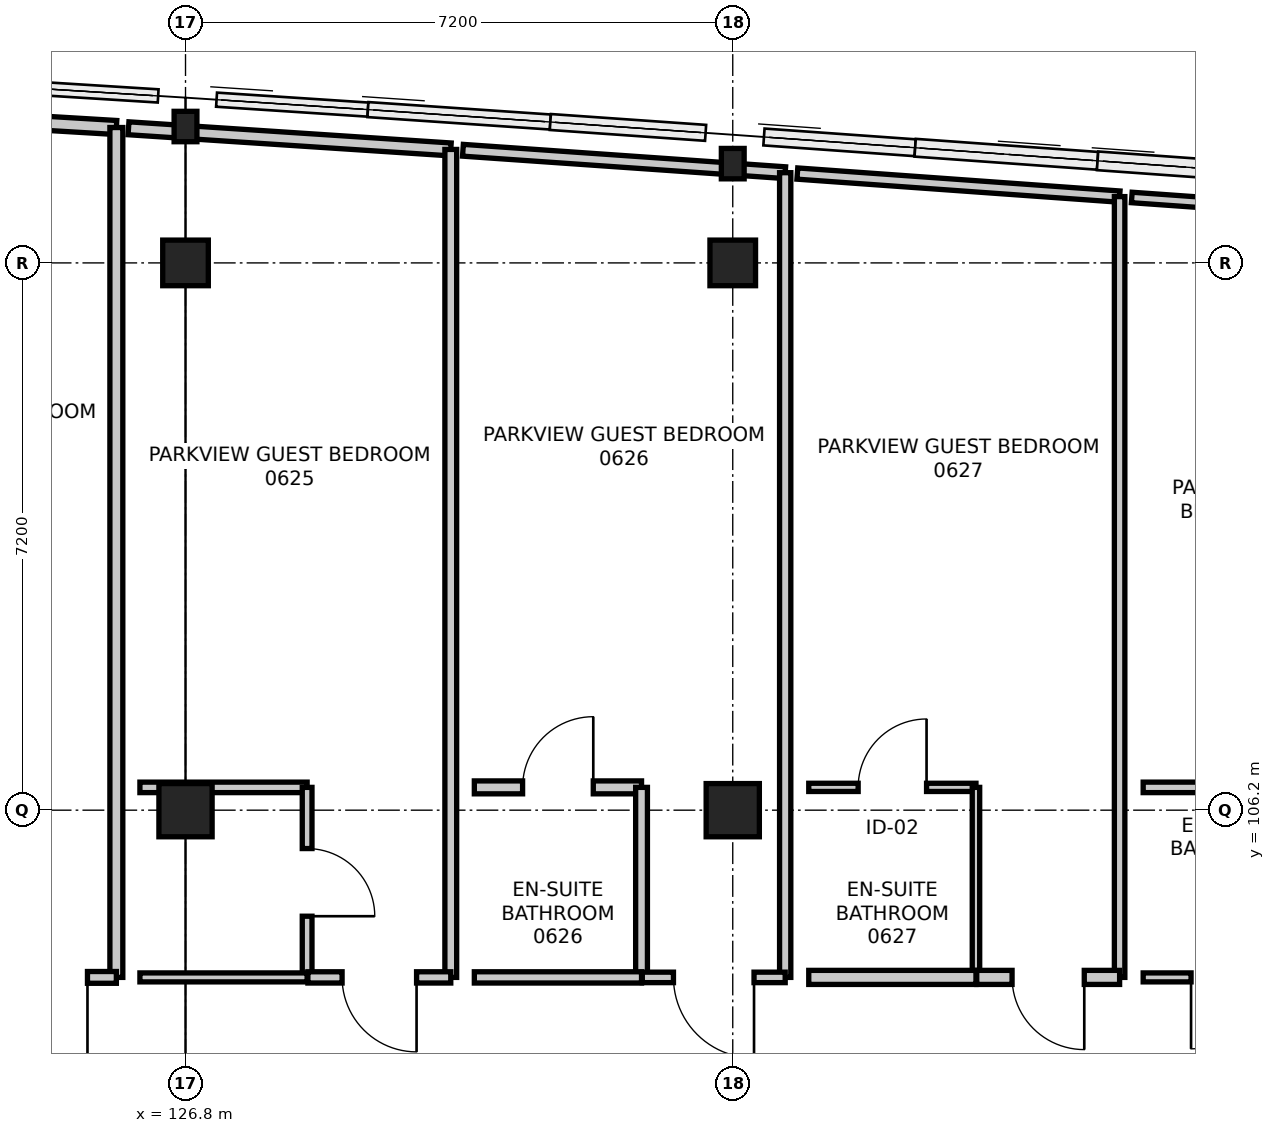
"""IFC4 building model, lengths in metres.
Left out: names, types, materials, properties, quantities, classifications, styles, units other than length and angle.
Written with IfcOpenShell. Run it as: python <this file> out.ifc"""

import sys

from ifc_helpers import new_model, si_unit, direction, frame, frame_2d, origin, origin_2d, place, context, subcontext, project, spatial, rectangle, i_section, extrude, element, fill, save


model = new_model("IFC4")
c1 = context("Model", 3, precision=1e-05, world=origin(), true_north=direction((0.0, 1.0)))
c2 = subcontext(c1, "Body", "Model", "MODEL_VIEW")
j1 = project(units=[si_unit("LENGTHUNIT", "METRE"), si_unit("PLANEANGLEUNIT", "RADIAN")], contexts=[c1])
p1 = place(None, origin())
s1 = spatial("IfcSite", under=j1, at=p1, CompositionType="ELEMENT")
p2 = place(p1, origin())
s2 = spatial("IfcBuilding", under=s1, at=p2, CompositionType="ELEMENT")
p3 = place(p2, frame((0.0, 0.0, 26.4)))
s3 = spatial("IfcBuildingStorey", under=s2, at=p3, CompositionType="ELEMENT", Elevation=26.4)
p4 = place(p3, frame((126.8, 106.2, 0.0), z_axis=(0.0, 0.0, 1.0), x_axis=(1.0, 0.0, 0.0)))
e1 = element("IfcColumn", 1, at=p4, inside=s3, PredefinedType="COLUMN", context=c2, shape_type="SweptSolid", body=[
    extrude(rectangle(XDim=0.7, YDim=0.7, at=origin_2d()), origin(), (0.0, 0.0, 1.0), 3.6),
])
p5 = place(p3, frame((126.8, 113.4, 0.0), z_axis=(0.0, 0.0, 1.0), x_axis=(1.0, 0.0, 0.0)))
e2 = element("IfcColumn", 2, at=p5, inside=s3, PredefinedType="COLUMN", context=c2, shape_type="SweptSolid", body=[
    extrude(rectangle(XDim=0.6, YDim=0.6, at=origin_2d()), origin(), (0.0, 0.0, 1.0), 3.6),
])
p6 = place(p3, frame((126.8, 115.194, 0.0), z_axis=(0.0, 0.0, 1.0), x_axis=(1.0, 0.0, 0.0)))
e3 = element("IfcColumn", 3, at=p6, inside=s3, PredefinedType="COLUMN", context=c2, shape_type="SweptSolid", body=[
    extrude(i_section(OverallWidth=0.3, OverallDepth=0.4, WebThickness=0.013, FlangeThickness=0.024, FilletRadius=0.027, at=origin_2d()), origin(), (0.0, 0.0, 1.0), 3.6),
])
p7 = place(p3, frame((134.0, 106.2, 0.0), z_axis=(0.0, 0.0, 1.0), x_axis=(1.0, 0.0, 0.0)))
e4 = element("IfcColumn", 4, at=p7, inside=s3, PredefinedType="COLUMN", context=c2, shape_type="SweptSolid", body=[
    extrude(rectangle(XDim=0.7, YDim=0.7, at=origin_2d()), origin(), (0.0, 0.0, 1.0), 3.6),
])
p8 = place(p3, frame((134.0, 113.4, 0.0), z_axis=(0.0, 0.0, 1.0), x_axis=(1.0, 0.0, 0.0)))
e5 = element("IfcColumn", 5, at=p8, inside=s3, PredefinedType="COLUMN", context=c2, shape_type="SweptSolid", body=[
    extrude(rectangle(XDim=0.6, YDim=0.6, at=origin_2d()), origin(), (0.0, 0.0, 1.0), 3.6),
])
p9 = place(p3, frame((134.0, 114.706, 0.0), z_axis=(0.0, 0.0, 1.0), x_axis=(1.0, 0.0, 0.0)))
e6 = element("IfcColumn", 6, at=p9, inside=s3, PredefinedType="COLUMN", context=c2, shape_type="SweptSolid", body=[
    extrude(i_section(OverallWidth=0.3, OverallDepth=0.4, WebThickness=0.013, FlangeThickness=0.024, FilletRadius=0.027, at=origin_2d()), origin(), (0.0, 0.0, 1.0), 3.6),
])
p10 = place(p3, frame((121.65, 115.435, 0.0), z_axis=(0.0, 0.0, 1.0), x_axis=(0.998211780047, -0.059776602248, 0.0)))
e7 = element("IfcWall", 7, at=p10, inside=s3, PredefinedType="PARTITIONING", context=c2, shape_type="SweptSolid", body=[
    extrude(rectangle(XDim=4.248, YDim=0.185, at=frame_2d((2.124, 0.0))), origin(), (0.0, 0.0, 1.0), 2.926),
])
p11 = place(p3, frame((125.89, 115.181, 0.0), z_axis=(0.0, 0.0, 1.0), x_axis=(0.0, -1.0, 0.0)))
e8 = element("IfcWall", 8, at=p11, inside=s3, PredefinedType="PARTITIONING", context=c2, shape_type="SweptSolid", body=[
    extrude(rectangle(XDim=11.181, YDim=0.17, at=frame_2d((5.591, 0.0))), origin(), (0.0, 0.0, 1.0), 2.735),
])
p12 = place(p3, frame((125.89, 104.0, 0.0), z_axis=(0.0, 0.0, 1.0), x_axis=(-1.0, 0.0, 0.0)))
e9 = element("IfcWall", 9, at=p12, inside=s3, PredefinedType="PARTITIONING", context=c2, shape_type="SweptSolid", body=[
    extrude(rectangle(XDim=1.88, YDim=0.155, at=frame_2d((0.94, 0.0))), origin(), (0.0, 0.0, 1.0), 3.35),
])
p13 = place(p12, frame((0.38, 0.0, 0.0)))
e10 = element("IfcOpeningElement", 10, at=p13, cuts=e9, PredefinedType="OPENING", context=c2, shape_type="SweptSolid", body=[
    extrude(rectangle(XDim=1.12, YDim=2.2, at=frame_2d((0.56, 1.1))), frame((0.0, 0.087, 0.0), z_axis=(0.0, -1.0, 0.0), x_axis=(1.0, 0.0, 0.0)), (0.0, 0.0, 1.0), 0.175),
])
p14 = place(p3, frame((126.2, 106.5, 0.0), z_axis=(0.0, 0.0, 1.0), x_axis=(1.0, 0.0, 0.0)))
e11 = element("IfcWall", 11, at=p14, inside=s3, PredefinedType="PARTITIONING", context=c2, shape_type="SweptSolid", body=[
    extrude(rectangle(XDim=2.2, YDim=0.138, at=frame_2d((1.1, 0.0))), origin(), (0.0, 0.0, 1.0), 2.685),
])
p15 = place(p3, frame((128.4, 106.5, 0.0), z_axis=(0.0, 0.0, 1.0), x_axis=(0.0, -1.0, 0.0)))
e12 = element("IfcWall", 12, at=p15, inside=s3, PredefinedType="PARTITIONING", context=c2, shape_type="SweptSolid", body=[
    extrude(rectangle(XDim=2.5, YDim=0.128, at=frame_2d((1.25, 0.0))), origin(), (0.0, 0.0, 1.0), 2.735),
])
p16 = place(p15, frame((0.805, 0.0, 0.0)))
e13 = element("IfcOpeningElement", 13, at=p16, cuts=e12, PredefinedType="OPENING", context=c2, shape_type="SweptSolid", body=[
    extrude(rectangle(XDim=0.89, YDim=2.09, at=frame_2d((0.445, 1.045))), frame((0.0, 0.074, 0.0), z_axis=(0.0, -1.0, 0.0), x_axis=(1.0, 0.0, 0.0)), (0.0, 0.0, 1.0), 0.148),
])
p17 = place(p3, frame((128.4, 104.0, 0.0), z_axis=(0.0, 0.0, 1.0), x_axis=(-1.0, 0.0, 0.0)))
e14 = element("IfcWall", 14, at=p17, inside=s3, PredefinedType="PARTITIONING", context=c2, shape_type="SweptSolid", body=[
    extrude(rectangle(XDim=2.2, YDim=0.118, at=frame_2d((1.1, 0.0))), origin(), (0.0, 0.0, 1.0), 2.685),
])
p18 = place(p3, frame((126.05, 115.171, 0.0), z_axis=(0.0, 0.0, 1.0), x_axis=(0.997852518731, -0.065500769929, 0.0)))
e15 = element("IfcWall", 15, at=p18, inside=s3, PredefinedType="PARTITIONING", context=c2, shape_type="SweptSolid", body=[
    extrude(rectangle(XDim=4.249, YDim=0.17, at=frame_2d((2.125, 0.0))), origin(), (0.0, 0.0, 1.0), 2.926),
])
p19 = place(p3, frame((130.29, 114.893, 0.0), z_axis=(0.0, 0.0, 1.0), x_axis=(0.0, -1.0, 0.0)))
e16 = element("IfcWall", 16, at=p19, inside=s3, PredefinedType="PARTITIONING", context=c2, shape_type="SweptSolid", body=[
    extrude(rectangle(XDim=10.893, YDim=0.155, at=frame_2d((5.446, 0.0))), origin(), (0.0, 0.0, 1.0), 2.735),
])
p20 = place(p3, frame((130.29, 104.0, 0.0), z_axis=(0.0, 0.0, 1.0), x_axis=(-1.0, 0.0, 0.0)))
e17 = element("IfcWall", 17, at=p20, inside=s3, PredefinedType="PARTITIONING", context=c2, shape_type="SweptSolid", body=[
    extrude(rectangle(XDim=1.88, YDim=0.148, at=frame_2d((0.94, 0.0))), origin(), (0.0, 0.0, 1.0), 3.35),
])
p21 = place(p20, frame((0.45, 0.0, 0.0)))
e18 = element("IfcOpeningElement", 18, at=p21, cuts=e17, PredefinedType="OPENING", context=c2, shape_type="SweptSolid", body=[
    extrude(rectangle(XDim=0.98, YDim=2.15, at=frame_2d((0.49, 1.075))), frame((0.0, 0.084, 0.0), z_axis=(0.0, -1.0, 0.0), x_axis=(1.0, 0.0, 0.0)), (0.0, 0.0, 1.0), 0.168),
])
p22 = place(p3, frame((130.6, 106.5, 0.0), z_axis=(0.0, 0.0, 1.0), x_axis=(1.0, 0.0, 0.0)))
e19 = element("IfcWall", 19, at=p22, inside=s3, PredefinedType="PARTITIONING", context=c2, shape_type="SweptSolid", body=[
    extrude(rectangle(XDim=2.2, YDim=0.17, at=frame_2d((1.1, 0.0))), origin(), (0.0, 0.0, 1.0), 2.735),
])
p23 = place(p22, frame((0.635, 0.0, 0.0)))
e20 = element("IfcOpeningElement", 20, at=p23, cuts=e19, PredefinedType="OPENING", context=c2, shape_type="SweptSolid", body=[
    extrude(rectangle(XDim=0.93, YDim=2.13, at=frame_2d((0.465, 1.065))), frame((0.0, 0.095, 0.0), z_axis=(0.0, -1.0, 0.0), x_axis=(1.0, 0.0, 0.0)), (0.0, 0.0, 1.0), 0.19),
])
p24 = place(p3, frame((132.8, 106.5, 0.0), z_axis=(0.0, 0.0, 1.0), x_axis=(0.0, -1.0, 0.0)))
e21 = element("IfcWall", 21, at=p24, inside=s3, PredefinedType="PARTITIONING", context=c2, shape_type="SweptSolid", body=[
    extrude(rectangle(XDim=2.5, YDim=0.155, at=frame_2d((1.25, 0.0))), origin(), (0.0, 0.0, 1.0), 2.735),
])
p25 = place(p3, frame((132.8, 104.0, 0.0), z_axis=(0.0, 0.0, 1.0), x_axis=(-1.0, 0.0, 0.0)))
e22 = element("IfcWall", 22, at=p25, inside=s3, PredefinedType="PARTITIONING", context=c2, shape_type="SweptSolid", body=[
    extrude(rectangle(XDim=2.2, YDim=0.148, at=frame_2d((1.1, 0.0))), origin(), (0.0, 0.0, 1.0), 3.35),
])
p26 = place(p3, frame((130.45, 114.882, 0.0), z_axis=(0.0, 0.0, 1.0), x_axis=(0.997589640376, -0.069389548314, 0.0)))
e23 = element("IfcWall", 23, at=p26, inside=s3, PredefinedType="PARTITIONING", context=c2, shape_type="SweptSolid", body=[
    extrude(rectangle(XDim=4.25, YDim=0.155, at=frame_2d((2.125, 0.0))), origin(), (0.0, 0.0, 1.0), 2.926),
])
p27 = place(p3, frame((134.69, 114.587, 0.0), z_axis=(0.0, 0.0, 1.0), x_axis=(0.0, -1.0, 0.0)))
e24 = element("IfcWall", 24, at=p27, inside=s3, PredefinedType="PARTITIONING", context=c2, shape_type="SweptSolid", body=[
    extrude(rectangle(XDim=10.587, YDim=0.148, at=frame_2d((5.293, 0.0))), origin(), (0.0, 0.0, 1.0), 2.735),
])
p28 = place(p3, frame((134.69, 104.0, 0.0), z_axis=(0.0, 0.0, 1.0), x_axis=(-1.0, 0.0, 0.0)))
e25 = element("IfcWall", 25, at=p28, inside=s3, PredefinedType="PARTITIONING", context=c2, shape_type="SweptSolid", body=[
    extrude(rectangle(XDim=1.88, YDim=0.138, at=frame_2d((0.94, 0.0))), origin(), (0.0, 0.0, 1.0), 2.685),
])
p29 = place(p28, frame((0.41, 0.0, 0.0)))
e26 = element("IfcOpeningElement", 26, at=p29, cuts=e25, PredefinedType="OPENING", context=c2, shape_type="SweptSolid", body=[
    extrude(rectangle(XDim=1.06, YDim=2.2, at=frame_2d((0.53, 1.1))), frame((0.0, 0.079, 0.0), z_axis=(0.0, -1.0, 0.0), x_axis=(1.0, 0.0, 0.0)), (0.0, 0.0, 1.0), 0.158),
])
p30 = place(p3, frame((135.0, 106.5, 0.0), z_axis=(0.0, 0.0, 1.0), x_axis=(1.0, 0.0, 0.0)))
e27 = element("IfcWall", 27, at=p30, inside=s3, PredefinedType="PARTITIONING", context=c2, shape_type="SweptSolid", body=[
    extrude(rectangle(XDim=2.2, YDim=0.108, at=frame_2d((1.1, 0.0))), origin(), (0.0, 0.0, 1.0), 3.35),
])
p31 = place(p30, frame((0.65, 0.0, 0.0)))
e28 = element("IfcOpeningElement", 28, at=p31, cuts=e27, PredefinedType="OPENING", context=c2, shape_type="SweptSolid", body=[
    extrude(rectangle(XDim=0.9, YDim=2.08, at=frame_2d((0.45, 1.04))), frame((0.0, 0.064, 0.0), z_axis=(0.0, -1.0, 0.0), x_axis=(1.0, 0.0, 0.0)), (0.0, 0.0, 1.0), 0.128),
])
p32 = place(p3, frame((137.2, 106.5, 0.0), z_axis=(0.0, 0.0, 1.0), x_axis=(0.0, -1.0, 0.0)))
e29 = element("IfcWall", 29, at=p32, inside=s3, PredefinedType="PARTITIONING", context=c2, shape_type="SweptSolid", body=[
    extrude(rectangle(XDim=2.5, YDim=0.098, at=frame_2d((1.25, 0.0))), origin(), (0.0, 0.0, 1.0), 2.735),
])
p33 = place(p3, frame((137.2, 104.0, 0.0), z_axis=(0.0, 0.0, 1.0), x_axis=(-1.0, 0.0, 0.0)))
e30 = element("IfcWall", 30, at=p33, inside=s3, PredefinedType="PARTITIONING", context=c2, shape_type="SweptSolid", body=[
    extrude(rectangle(XDim=2.2, YDim=0.185, at=frame_2d((1.1, 0.0))), origin(), (0.0, 0.0, 1.0), 3.35),
])
p34 = place(p3, frame((134.85, 114.575, 0.0), z_axis=(0.0, 0.0, 1.0), x_axis=(0.997456658619, -0.071275621198, 0.0)))
e31 = element("IfcWall", 31, at=p34, inside=s3, PredefinedType="PARTITIONING", context=c2, shape_type="SweptSolid", body=[
    extrude(rectangle(XDim=4.251, YDim=0.148, at=frame_2d((2.125, 0.0))), origin(), (0.0, 0.0, 1.0), 2.926),
])
p35 = place(p3, frame((139.09, 114.272, 0.0), z_axis=(0.0, 0.0, 1.0), x_axis=(0.0, -1.0, 0.0)))
e32 = element("IfcWall", 32, at=p35, inside=s3, PredefinedType="PARTITIONING", context=c2, shape_type="SweptSolid", body=[
    extrude(rectangle(XDim=10.272, YDim=0.138, at=frame_2d((5.136, 0.0))), origin(), (0.0, 0.0, 1.0), 2.735),
])
p36 = place(p3, frame((139.09, 104.0, 0.0), z_axis=(0.0, 0.0, 1.0), x_axis=(-1.0, 0.0, 0.0)))
e33 = element("IfcWall", 33, at=p36, inside=s3, PredefinedType="PARTITIONING", context=c2, shape_type="SweptSolid", body=[
    extrude(rectangle(XDim=1.88, YDim=0.185, at=frame_2d((0.94, 0.0))), origin(), (0.0, 0.0, 1.0), 3.35),
])
p37 = place(p36, frame((0.465, 0.0, 0.0)))
e34 = element("IfcOpeningElement", 34, at=p37, cuts=e33, PredefinedType="OPENING", context=c2, shape_type="SweptSolid", body=[
    extrude(rectangle(XDim=0.95, YDim=2.1, at=frame_2d((0.475, 1.05))), frame((0.0, 0.103, 0.0), z_axis=(0.0, -1.0, 0.0), x_axis=(1.0, 0.0, 0.0)), (0.0, 0.0, 1.0), 0.205),
])
p38 = place(p3, frame((139.4, 106.5, 0.0), z_axis=(0.0, 0.0, 1.0), x_axis=(1.0, 0.0, 0.0)))
e35 = element("IfcWall", 35, at=p38, inside=s3, PredefinedType="PARTITIONING", context=c2, shape_type="SweptSolid", body=[
    extrude(rectangle(XDim=2.2, YDim=0.138, at=frame_2d((1.1, 0.0))), origin(), (0.0, 0.0, 1.0), 2.685),
])
p39 = place(p3, frame((141.6, 104.0, 0.0), z_axis=(0.0, 0.0, 1.0), x_axis=(-1.0, 0.0, 0.0)))
e36 = element("IfcWall", 36, at=p39, inside=s3, PredefinedType="PARTITIONING", context=c2, shape_type="SweptSolid", body=[
    extrude(rectangle(XDim=2.2, YDim=0.118, at=frame_2d((1.1, 0.0))), origin(), (0.0, 0.0, 1.0), 2.685),
])
p40 = place(p39, frame((0.63, 0.0, 0.0)))
e37 = element("IfcOpeningElement", 37, at=p40, cuts=e36, PredefinedType="OPENING", context=c2, shape_type="SweptSolid", body=[
    extrude(rectangle(XDim=0.94, YDim=2.12, at=frame_2d((0.47, 1.06))), frame((0.0, 0.069, 0.0), z_axis=(0.0, -1.0, 0.0), x_axis=(1.0, 0.0, 0.0)), (0.0, 0.0, 1.0), 0.138),
])
p41 = place(p3, frame((139.25, 114.261, 0.0), z_axis=(0.0, 0.0, 1.0), x_axis=(0.997477034285, -0.070989901214, 0.0)))
e38 = element("IfcWall", 38, at=p41, inside=s3, PredefinedType="PARTITIONING", context=c2, shape_type="SweptSolid", body=[
    extrude(rectangle(XDim=4.251, YDim=0.138, at=frame_2d((2.125, 0.0))), origin(), (0.0, 0.0, 1.0), 2.926),
])
p42 = place(p13, origin())
e39 = element("IfcDoor", 39, at=p42, inside=s3, OperationType="SINGLE_SWING_LEFT", PredefinedType="DOOR", context=c2, shape_type="SweptSolid", body=[
    extrude(rectangle(XDim=1.12, YDim=2.2, at=frame_2d((0.56, 1.1))), frame((0.0, 0.025, 0.0), z_axis=(0.0, -1.0, 0.0), x_axis=(1.0, 0.0, 0.0)), (0.0, 0.0, 1.0), 0.05),
])
fill(e10, e39)
p43 = place(p16, origin())
e40 = element("IfcDoor", 40, at=p43, inside=s3, OperationType="SINGLE_SWING_RIGHT", PredefinedType="DOOR", context=c2, shape_type="SweptSolid", body=[
    extrude(rectangle(XDim=0.89, YDim=2.09, at=frame_2d((0.445, 1.045))), frame((0.0, 0.025, 0.0), z_axis=(0.0, -1.0, 0.0), x_axis=(1.0, 0.0, 0.0)), (0.0, 0.0, 1.0), 0.05),
])
fill(e13, e40)
p44 = place(p21, origin())
e41 = element("IfcDoor", 41, at=p44, inside=s3, OperationType="SINGLE_SWING_LEFT", PredefinedType="DOOR", context=c2, shape_type="SweptSolid", body=[
    extrude(rectangle(XDim=0.98, YDim=2.15, at=frame_2d((0.49, 1.075))), frame((0.0, 0.025, 0.0), z_axis=(0.0, -1.0, 0.0), x_axis=(1.0, 0.0, 0.0)), (0.0, 0.0, 1.0), 0.05),
])
fill(e18, e41)
p45 = place(p23, origin())
e42 = element("IfcDoor", 42, at=p45, inside=s3, OperationType="SINGLE_SWING_RIGHT", PredefinedType="DOOR", context=c2, shape_type="SweptSolid", body=[
    extrude(rectangle(XDim=0.93, YDim=2.13, at=frame_2d((0.465, 1.065))), frame((0.0, 0.025, 0.0), z_axis=(0.0, -1.0, 0.0), x_axis=(1.0, 0.0, 0.0)), (0.0, 0.0, 1.0), 0.05),
])
fill(e20, e42)
p46 = place(p29, origin())
e43 = element("IfcDoor", 43, at=p46, inside=s3, OperationType="SINGLE_SWING_LEFT", PredefinedType="DOOR", context=c2, shape_type="SweptSolid", body=[
    extrude(rectangle(XDim=1.06, YDim=2.2, at=frame_2d((0.53, 1.1))), frame((0.0, 0.025, 0.0), z_axis=(0.0, -1.0, 0.0), x_axis=(1.0, 0.0, 0.0)), (0.0, 0.0, 1.0), 0.05),
])
fill(e26, e43)
p47 = place(p31, origin())
e44 = element("IfcDoor", 44, at=p47, inside=s3, OperationType="SINGLE_SWING_RIGHT", PredefinedType="DOOR", context=c2, shape_type="SweptSolid", body=[
    extrude(rectangle(XDim=0.9, YDim=2.08, at=frame_2d((0.45, 1.04))), frame((0.0, 0.025, 0.0), z_axis=(0.0, -1.0, 0.0), x_axis=(1.0, 0.0, 0.0)), (0.0, 0.0, 1.0), 0.05),
])
fill(e28, e44)
p48 = place(p37, origin())
e45 = element("IfcDoor", 45, at=p48, inside=s3, OperationType="SINGLE_SWING_LEFT", PredefinedType="DOOR", context=c2, shape_type="SweptSolid", body=[
    extrude(rectangle(XDim=0.95, YDim=2.1, at=frame_2d((0.475, 1.05))), frame((0.0, 0.025, 0.0), z_axis=(0.0, -1.0, 0.0), x_axis=(1.0, 0.0, 0.0)), (0.0, 0.0, 1.0), 0.05),
])
fill(e34, e45)
p49 = place(p40, origin())
e46 = element("IfcDoor", 46, at=p49, inside=s3, OperationType="SINGLE_SWING_RIGHT", PredefinedType="DOOR", context=c2, shape_type="SweptSolid", body=[
    extrude(rectangle(XDim=0.94, YDim=2.12, at=frame_2d((0.47, 1.06))), frame((0.0, 0.025, 0.0), z_axis=(0.0, -1.0, 0.0), x_axis=(1.0, 0.0, 0.0)), (0.0, 0.0, 1.0), 0.05),
])
fill(e37, e46)
save(model, sys.argv[1])
